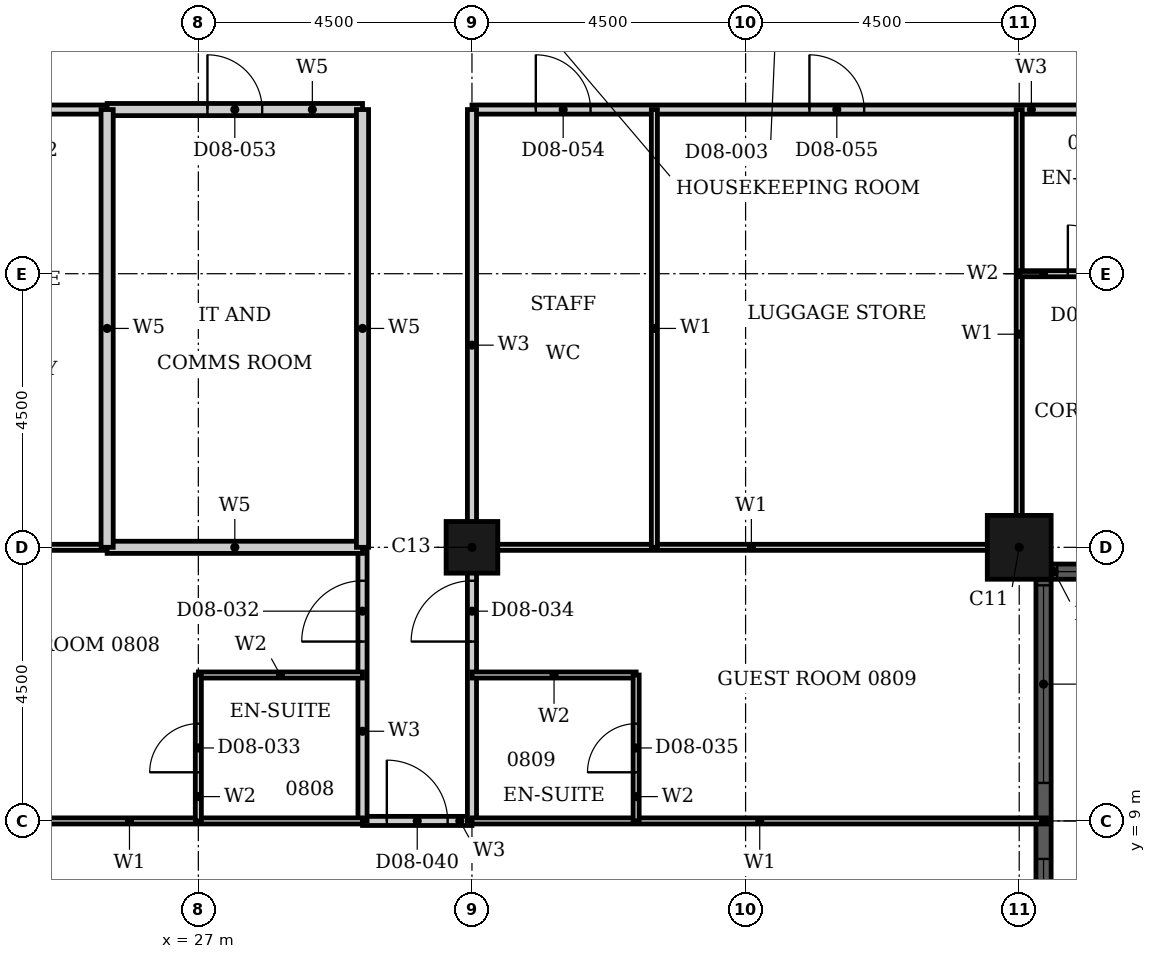
"""IFC4 building model, lengths in metres.
Left out: names, types, materials, properties, quantities, classifications, styles, units other than length and angle.
Written with IfcOpenShell. Run it as: python <this file> out.ifc"""

import sys

from ifc_helpers import new_model, si_unit, direction, frame, frame_2d, origin, origin_2d, place, context, subcontext, project, spatial, rectangle, hollow_rectangle, extrude, element, fill, save


model = new_model("IFC4")
c1 = context("Model", 3, precision=1e-05, world=origin(), true_north=direction((0.0, 1.0)))
c2 = subcontext(c1, "Body", "Model", "MODEL_VIEW")
j1 = project(units=[si_unit("LENGTHUNIT", "METRE"), si_unit("PLANEANGLEUNIT", "RADIAN")], contexts=[c1])
p1 = place(None, origin())
s1 = spatial("IfcSite", under=j1, at=p1, CompositionType="ELEMENT")
p2 = place(p1, origin())
s2 = spatial("IfcBuilding", under=s1, at=p2, CompositionType="ELEMENT")
p3 = place(p2, frame((0.0, 0.0, 40.8)))
s3 = spatial("IfcBuildingStorey", under=s2, at=p3, CompositionType="ELEMENT", Elevation=40.8)
p4 = place(p3, frame((40.5, 13.5, 0.0), z_axis=(0.0, 0.0, 1.0), x_axis=(1.0, 0.0, 0.0)))
e1 = element("IfcColumn", 1, at=p4, inside=s3, PredefinedType="COLUMN", context=c2, shape_type="SweptSolid", body=[
    extrude(hollow_rectangle(XDim=1.05, YDim=1.05, WallThickness=0.034, at=origin_2d()), origin(), (0.0, 0.0, 1.0), 3.6),
])
p5 = place(p3, frame((31.5, 13.5, 0.0), z_axis=(0.0, 0.0, 1.0), x_axis=(1.0, 0.0, 0.0)))
e2 = element("IfcColumn", 2, at=p5, inside=s3, PredefinedType="COLUMN", context=c2, shape_type="SweptSolid", body=[
    extrude(hollow_rectangle(XDim=0.85, YDim=0.85, WallThickness=0.026, at=origin_2d()), origin(), (0.0, 0.0, 1.0), 3.6),
])
p6 = place(p3, frame((40.9, 5.025, 0.0), z_axis=(0.0, 0.0, 1.0), x_axis=(0.0, 1.0, 0.0)))
e3 = element("IfcWall", 3, at=p6, inside=s3, PredefinedType="SOLIDWALL", context=c2, shape_type="SweptSolid", body=[
    extrude(rectangle(XDim=7.95, YDim=0.25, at=frame_2d((3.975, 0.0))), origin(), (0.0, 0.0, 1.0), 3.6),
])
p7 = place(p6, frame((0.1, 0.0, 0.9)))
e4 = element("IfcOpeningElement", 4, at=p7, cuts=e3, PredefinedType="OPENING", context=c2, shape_type="SweptSolid", body=[
    extrude(rectangle(XDim=3.25, YDim=2.08, at=frame_2d((1.625, 1.04))), frame((0.0, 0.135, 0.0), z_axis=(0.0, -1.0, 0.0), x_axis=(1.0, 0.0, 0.0)), (0.0, 0.0, 1.0), 0.27),
])
p8 = place(p6, frame((4.6, 0.0, 0.9)))
e5 = element("IfcOpeningElement", 5, at=p8, cuts=e3, PredefinedType="OPENING", context=c2, shape_type="SweptSolid", body=[
    extrude(rectangle(XDim=3.25, YDim=2.08, at=frame_2d((1.625, 1.04))), frame((0.0, 0.135, 0.0), z_axis=(0.0, -1.0, 0.0), x_axis=(1.0, 0.0, 0.0)), (0.0, 0.0, 1.0), 0.27),
])
p9 = place(p3, frame((41.025, 13.1, 0.0), z_axis=(0.0, 0.0, 1.0), x_axis=(1.0, 0.0, 0.0)))
e6 = element("IfcWall", 6, at=p9, inside=s3, PredefinedType="SOLIDWALL", context=c2, shape_type="SweptSolid", body=[
    extrude(rectangle(XDim=3.45, YDim=0.25, at=frame_2d((1.725, 0.0))), origin(), (0.0, 0.0, 1.0), 3.6),
])
p10 = place(p9, frame((0.1, 0.0, 0.9)))
e7 = element("IfcOpeningElement", 7, at=p10, cuts=e6, PredefinedType="OPENING", context=c2, shape_type="SweptSolid", body=[
    extrude(rectangle(XDim=3.25, YDim=2.08, at=frame_2d((1.625, 1.04))), frame((0.0, 0.135, 0.0), z_axis=(0.0, -1.0, 0.0), x_axis=(1.0, 0.0, 0.0)), (0.0, 0.0, 1.0), 0.27),
])
p11 = place(p3, frame((16.2, 20.7, 0.0), z_axis=(0.0, 0.0, 1.0), x_axis=(1.0, 0.0, 0.0)))
e8 = element("IfcWall", 8, at=p11, inside=s3, PredefinedType="PARTITIONING", context=c2, shape_type="SweptSolid", body=[
    extrude(rectangle(XDim=9.3, YDim=0.15, at=frame_2d((4.65, 0.0))), origin(), (0.0, 0.0, 1.0), 3.3),
])
p12 = place(p11, frame((4.75, 0.0, 0.0)))
e9 = element("IfcOpeningElement", 9, at=p12, cuts=e8, PredefinedType="OPENING", context=c2, shape_type="SweptSolid", body=[
    extrude(rectangle(XDim=1.0, YDim=2.1, at=frame_2d((0.5, 1.05))), frame((0.0, 0.085, 0.0), z_axis=(0.0, -1.0, 0.0), x_axis=(1.0, 0.0, 0.0)), (0.0, 0.0, 1.0), 0.17),
])
p13 = place(p11, frame((7.35, 0.0, 0.0)))
e10 = element("IfcOpeningElement", 10, at=p13, cuts=e8, PredefinedType="OPENING", context=c2, shape_type="SweptSolid", body=[
    extrude(rectangle(XDim=0.9, YDim=2.1, at=frame_2d((0.45, 1.05))), frame((0.0, 0.085, 0.0), z_axis=(0.0, -1.0, 0.0), x_axis=(1.0, 0.0, 0.0)), (0.0, 0.0, 1.0), 0.17),
])
p14 = place(p3, frame((31.5, 20.7, 0.0), z_axis=(0.0, 0.0, 1.0), x_axis=(1.0, 0.0, 0.0)))
e11 = element("IfcWall", 11, at=p14, inside=s3, PredefinedType="PARTITIONING", context=c2, shape_type="SweptSolid", body=[
    extrude(rectangle(XDim=15.3, YDim=0.15, at=frame_2d((7.65, 0.0))), origin(), (0.0, 0.0, 1.0), 3.3),
])
p15 = place(p14, frame((11.95, 0.0, 0.0)))
e12 = element("IfcOpeningElement", 12, at=p15, cuts=e11, PredefinedType="OPENING", context=c2, shape_type="SweptSolid", body=[
    extrude(rectangle(XDim=1.0, YDim=2.1, at=frame_2d((0.5, 1.05))), frame((0.0, 0.085, 0.0), z_axis=(0.0, -1.0, 0.0), x_axis=(1.0, 0.0, 0.0)), (0.0, 0.0, 1.0), 0.17),
])
p16 = place(p14, frame((1.05, 0.0, 0.0)))
e13 = element("IfcOpeningElement", 13, at=p16, cuts=e11, PredefinedType="OPENING", context=c2, shape_type="SweptSolid", body=[
    extrude(rectangle(XDim=0.9, YDim=2.1, at=frame_2d((0.45, 1.05))), frame((0.0, 0.085, 0.0), z_axis=(0.0, -1.0, 0.0), x_axis=(1.0, 0.0, 0.0)), (0.0, 0.0, 1.0), 0.17),
])
p17 = place(p14, frame((5.55, 0.0, 0.0)))
e14 = element("IfcOpeningElement", 14, at=p17, cuts=e11, PredefinedType="OPENING", context=c2, shape_type="SweptSolid", body=[
    extrude(rectangle(XDim=0.9, YDim=2.1, at=frame_2d((0.45, 1.05))), frame((0.0, 0.085, 0.0), z_axis=(0.0, -1.0, 0.0), x_axis=(1.0, 0.0, 0.0)), (0.0, 0.0, 1.0), 0.17),
])
p18 = place(p3, frame((29.7, 9.0, 0.0), z_axis=(0.0, 0.0, 1.0), x_axis=(1.0, 0.0, 0.0)))
e15 = element("IfcWall", 15, at=p18, inside=s3, PredefinedType="PARTITIONING", context=c2, shape_type="SweptSolid", body=[
    extrude(rectangle(XDim=1.8, YDim=0.15, at=frame_2d((0.9, 0.0))), origin(), (0.0, 0.0, 1.0), 3.3),
])
p19 = place(p18, frame((0.4, 0.0, 0.0)))
e16 = element("IfcOpeningElement", 16, at=p19, cuts=e15, PredefinedType="OPENING", context=c2, shape_type="SweptSolid", body=[
    extrude(rectangle(XDim=1.0, YDim=2.1, at=frame_2d((0.5, 1.05))), frame((0.0, 0.085, 0.0), z_axis=(0.0, -1.0, 0.0), x_axis=(1.0, 0.0, 0.0)), (0.0, 0.0, 1.0), 0.17),
])
p20 = place(p3, frame((29.7, 9.0, 0.0), z_axis=(0.0, 0.0, 1.0), x_axis=(0.0, 1.0, 0.0)))
e17 = element("IfcWall", 17, at=p20, inside=s3, PredefinedType="PARTITIONING", context=c2, shape_type="SweptSolid", body=[
    extrude(rectangle(XDim=4.5, YDim=0.15, at=frame_2d((2.25, 0.0))), origin(), (0.0, 0.0, 1.0), 3.3),
])
p21 = place(p20, frame((2.95, 0.0, 0.0)))
e18 = element("IfcOpeningElement", 18, at=p21, cuts=e17, PredefinedType="OPENING", context=c2, shape_type="SweptSolid", body=[
    extrude(rectangle(XDim=1.0, YDim=2.1, at=frame_2d((0.5, 1.05))), frame((0.0, 0.085, 0.0), z_axis=(0.0, -1.0, 0.0), x_axis=(1.0, 0.0, 0.0)), (0.0, 0.0, 1.0), 0.17),
])
p22 = place(p3, frame((31.5, 9.0, 0.0), z_axis=(0.0, 0.0, 1.0), x_axis=(0.0, 1.0, 0.0)))
e19 = element("IfcWall", 19, at=p22, inside=s3, PredefinedType="PARTITIONING", context=c2, shape_type="SweptSolid", body=[
    extrude(rectangle(XDim=11.7, YDim=0.15, at=frame_2d((5.85, 0.0))), origin(), (0.0, 0.0, 1.0), 2.58),
])
p23 = place(p22, frame((2.95, 0.0, 0.0)))
e20 = element("IfcOpeningElement", 20, at=p23, cuts=e19, PredefinedType="OPENING", context=c2, shape_type="SweptSolid", body=[
    extrude(rectangle(XDim=1.0, YDim=2.1, at=frame_2d((0.5, 1.05))), frame((0.0, 0.085, 0.0), z_axis=(0.0, -1.0, 0.0), x_axis=(1.0, 0.0, 0.0)), (0.0, 0.0, 1.0), 0.17),
])
p24 = place(p3, frame((31.5, 13.5, 0.0), z_axis=(0.0, 0.0, 1.0), x_axis=(1.0, 0.0, 0.0)))
e21 = element("IfcWall", 21, at=p24, inside=s3, PredefinedType="PARTITIONING", context=c2, shape_type="SweptSolid", body=[
    extrude(rectangle(XDim=9.19, YDim=0.1, at=frame_2d((4.595, 0.0))), origin(), (0.0, 0.0, 1.0), 2.38),
])
p25 = place(p3, frame((22.31, 13.5, 0.0), z_axis=(0.0, 0.0, 1.0), x_axis=(1.0, 0.0, 0.0)))
e22 = element("IfcWall", 22, at=p25, inside=s3, PredefinedType="PARTITIONING", context=c2, shape_type="SweptSolid", body=[
    extrude(rectangle(XDim=3.19, YDim=0.1, at=frame_2d((1.595, 0.0))), origin(), (0.0, 0.0, 1.0), 2.38),
])
p26 = place(p3, frame((31.5, 9.0, 0.0), z_axis=(0.0, 0.0, 1.0), x_axis=(1.0, 0.0, 0.0)))
e23 = element("IfcWall", 23, at=p26, inside=s3, PredefinedType="PARTITIONING", context=c2, shape_type="SweptSolid", body=[
    extrude(rectangle(XDim=9.465, YDim=0.1, at=frame_2d((4.732, 0.0))), origin(), (0.0, 0.0, 1.0), 3.3),
])
p27 = place(p3, frame((22.035, 9.0, 0.0), z_axis=(0.0, 0.0, 1.0), x_axis=(1.0, 0.0, 0.0)))
e24 = element("IfcWall", 24, at=p27, inside=s3, PredefinedType="PARTITIONING", context=c2, shape_type="SweptSolid", body=[
    extrude(rectangle(XDim=7.665, YDim=0.1, at=frame_2d((3.833, 0.0))), origin(), (0.0, 0.0, 1.0), 3.3),
])
p28 = place(p3, frame((34.5, 13.5, 0.0), z_axis=(0.0, 0.0, 1.0), x_axis=(0.0, 1.0, 0.0)))
e25 = element("IfcWall", 25, at=p28, inside=s3, PredefinedType="PARTITIONING", context=c2, shape_type="SweptSolid", body=[
    extrude(rectangle(XDim=7.2, YDim=0.1, at=frame_2d((3.6, 0.0))), origin(), (0.0, 0.0, 1.0), 3.3),
])
p29 = place(p3, frame((40.5, 13.31, 0.0), z_axis=(0.0, 0.0, 1.0), x_axis=(0.0, 1.0, 0.0)))
e26 = element("IfcWall", 26, at=p29, inside=s3, PredefinedType="PARTITIONING", context=c2, shape_type="SweptSolid", body=[
    extrude(rectangle(XDim=7.39, YDim=0.1, at=frame_2d((3.695, 0.0))), origin(), (0.0, 0.0, 1.0), 3.3),
])
for number, where, z_axis, x_axis in (
    (27, (31.5, 11.4, 0.0), (0.0, 0.0, 1.0), (1.0, 0.0, 0.0)),
    (28, (27.0, 11.4, 0.0), (0.0, 0.0, 1.0), (1.0, 0.0, 0.0)),
):
    element("IfcWall", number, at=place(p3, frame(where, z_axis=z_axis, x_axis=x_axis)), inside=s3, PredefinedType="PARTITIONING", context=c2, shape_type="SweptSolid", body=[
        extrude(rectangle(XDim=2.7, YDim=0.1, at=frame_2d((1.35, 0.0))), origin(), (0.0, 0.0, 1.0), 3.3),
    ])
p30 = place(p3, frame((40.5, 18.0, 0.0), z_axis=(0.0, 0.0, 1.0), x_axis=(1.0, 0.0, 0.0)))
e29 = element("IfcWall", 29, at=p30, inside=s3, PredefinedType="PARTITIONING", context=c2, shape_type="SweptSolid", body=[
    extrude(rectangle(XDim=2.4, YDim=0.1, at=frame_2d((1.2, 0.0))), origin(), (0.0, 0.0, 1.0), 3.3),
])
p31 = place(p30, frame((0.8, 0.0, 0.0)))
e30 = element("IfcOpeningElement", 30, at=p31, cuts=e29, PredefinedType="OPENING", context=c2, shape_type="SweptSolid", body=[
    extrude(rectangle(XDim=0.8, YDim=2.1, at=frame_2d((0.4, 1.05))), frame((0.0, 0.06, 0.0), z_axis=(0.0, -1.0, 0.0), x_axis=(1.0, 0.0, 0.0)), (0.0, 0.0, 1.0), 0.12),
])
p32 = place(p3, frame((27.0, 9.0, 0.0), z_axis=(0.0, 0.0, 1.0), x_axis=(0.0, 1.0, 0.0)))
e31 = element("IfcWall", 31, at=p32, inside=s3, PredefinedType="PARTITIONING", context=c2, shape_type="SweptSolid", body=[
    extrude(rectangle(XDim=2.4, YDim=0.1, at=frame_2d((1.2, 0.0))), origin(), (0.0, 0.0, 1.0), 2.58),
])
p33 = place(p32, frame((0.8, 0.0, 0.0)))
e32 = element("IfcOpeningElement", 32, at=p33, cuts=e31, PredefinedType="OPENING", context=c2, shape_type="SweptSolid", body=[
    extrude(rectangle(XDim=0.8, YDim=2.1, at=frame_2d((0.4, 1.05))), frame((0.0, 0.06, 0.0), z_axis=(0.0, -1.0, 0.0), x_axis=(1.0, 0.0, 0.0)), (0.0, 0.0, 1.0), 0.12),
])
p34 = place(p3, frame((34.2, 9.0, 0.0), z_axis=(0.0, 0.0, 1.0), x_axis=(0.0, 1.0, 0.0)))
e33 = element("IfcWall", 33, at=p34, inside=s3, PredefinedType="PARTITIONING", context=c2, shape_type="SweptSolid", body=[
    extrude(rectangle(XDim=2.4, YDim=0.1, at=frame_2d((1.2, 0.0))), origin(), (0.0, 0.0, 1.0), 3.3),
])
p35 = place(p34, frame((0.8, 0.0, 0.0)))
e34 = element("IfcOpeningElement", 34, at=p35, cuts=e33, PredefinedType="OPENING", context=c2, shape_type="SweptSolid", body=[
    extrude(rectangle(XDim=0.8, YDim=2.1, at=frame_2d((0.4, 1.05))), frame((0.0, 0.06, 0.0), z_axis=(0.0, -1.0, 0.0), x_axis=(1.0, 0.0, 0.0)), (0.0, 0.0, 1.0), 0.12),
])
p36 = place(p3, frame((25.5, 13.5, 0.0), z_axis=(0.0, 0.0, 1.0), x_axis=(1.0, 0.0, 0.0)))
e35 = element("IfcWall", 35, at=p36, inside=s3, PredefinedType="PARTITIONING", context=c2, shape_type="SweptSolid", body=[
    extrude(rectangle(XDim=4.2, YDim=0.2, at=frame_2d((2.1, 0.0))), origin(), (0.0, 0.0, 1.0), 2.38),
])
p37 = place(p3, frame((25.5, 20.7, 0.0), z_axis=(0.0, 0.0, 1.0), x_axis=(1.0, 0.0, 0.0)))
e36 = element("IfcWall", 36, at=p37, inside=s3, PredefinedType="PARTITIONING", context=c2, shape_type="SweptSolid", body=[
    extrude(rectangle(XDim=4.2, YDim=0.2, at=frame_2d((2.1, 0.0))), origin(), (0.0, 0.0, 1.0), 3.3),
])
p38 = place(p37, frame((1.65, 0.0, 0.0)))
e37 = element("IfcOpeningElement", 37, at=p38, cuts=e36, PredefinedType="OPENING", context=c2, shape_type="SweptSolid", body=[
    extrude(rectangle(XDim=0.9, YDim=2.1, at=frame_2d((0.45, 1.05))), frame((0.0, 0.11, 0.0), z_axis=(0.0, -1.0, 0.0), x_axis=(1.0, 0.0, 0.0)), (0.0, 0.0, 1.0), 0.22),
])
for number, where, z_axis, x_axis in (
    (38, (25.5, 13.5, 0.0), (0.0, 0.0, 1.0), (0.0, 1.0, 0.0)),
    (39, (29.7, 13.5, 0.0), (0.0, 0.0, 1.0), (0.0, 1.0, 0.0)),
):
    element("IfcWall", number, at=place(p3, frame(where, z_axis=z_axis, x_axis=x_axis)), inside=s3, PredefinedType="PARTITIONING", context=c2, shape_type="SweptSolid", body=[
        extrude(rectangle(XDim=7.2, YDim=0.2, at=frame_2d((3.6, 0.0))), origin(), (0.0, 0.0, 1.0), 3.3),
    ])
p39 = place(p7, origin())
e40 = element("IfcWindow", 40, at=p39, inside=s3, PartitioningType="SINGLE_PANEL", PredefinedType="WINDOW", context=c2, shape_type="SweptSolid", body=[
    extrude(rectangle(XDim=3.25, YDim=2.08, at=frame_2d((1.625, 1.04))), frame((0.0, 0.03, 0.0), z_axis=(0.0, -1.0, 0.0), x_axis=(1.0, 0.0, 0.0)), (0.0, 0.0, 1.0), 0.06),
])
fill(e4, e40)
p40 = place(p8, origin())
e41 = element("IfcWindow", 41, at=p40, inside=s3, PartitioningType="SINGLE_PANEL", PredefinedType="WINDOW", context=c2, shape_type="SweptSolid", body=[
    extrude(rectangle(XDim=3.25, YDim=2.08, at=frame_2d((1.625, 1.04))), frame((0.0, 0.03, 0.0), z_axis=(0.0, -1.0, 0.0), x_axis=(1.0, 0.0, 0.0)), (0.0, 0.0, 1.0), 0.06),
])
fill(e5, e41)
p41 = place(p10, origin())
e42 = element("IfcWindow", 42, at=p41, inside=s3, PartitioningType="SINGLE_PANEL", PredefinedType="WINDOW", context=c2, shape_type="SweptSolid", body=[
    extrude(rectangle(XDim=3.25, YDim=2.08, at=frame_2d((1.625, 1.04))), frame((0.0, 0.03, 0.0), z_axis=(0.0, -1.0, 0.0), x_axis=(1.0, 0.0, 0.0)), (0.0, 0.0, 1.0), 0.06),
])
fill(e7, e42)
p42 = place(p21, origin())
e43 = element("IfcDoor", 43, at=p42, inside=s3, OperationType="SINGLE_SWING_RIGHT", PredefinedType="DOOR", context=c2, shape_type="SweptSolid", body=[
    extrude(rectangle(XDim=1.0, YDim=2.1, at=frame_2d((0.5, 1.05))), frame((0.0, 0.025, 0.0), z_axis=(0.0, -1.0, 0.0), x_axis=(1.0, 0.0, 0.0)), (0.0, 0.0, 1.0), 0.05),
])
fill(e18, e43)
p43 = place(p33, origin())
e44 = element("IfcDoor", 44, at=p43, inside=s3, OperationType="SINGLE_SWING_LEFT", PredefinedType="DOOR", context=c2, shape_type="SweptSolid", body=[
    extrude(rectangle(XDim=0.8, YDim=2.1, at=frame_2d((0.4, 1.05))), frame((0.0, 0.025, 0.0), z_axis=(0.0, -1.0, 0.0), x_axis=(1.0, 0.0, 0.0)), (0.0, 0.0, 1.0), 0.05),
])
fill(e32, e44)
p44 = place(p23, origin())
e45 = element("IfcDoor", 45, at=p44, inside=s3, OperationType="SINGLE_SWING_RIGHT", PredefinedType="DOOR", context=c2, shape_type="SweptSolid", body=[
    extrude(rectangle(XDim=1.0, YDim=2.1, at=frame_2d((0.5, 1.05))), frame((0.0, 0.025, 0.0), z_axis=(0.0, -1.0, 0.0), x_axis=(1.0, 0.0, 0.0)), (0.0, 0.0, 1.0), 0.05),
])
fill(e20, e45)
p45 = place(p35, origin())
e46 = element("IfcDoor", 46, at=p45, inside=s3, OperationType="SINGLE_SWING_LEFT", PredefinedType="DOOR", context=c2, shape_type="SweptSolid", body=[
    extrude(rectangle(XDim=0.8, YDim=2.1, at=frame_2d((0.4, 1.05))), frame((0.0, 0.025, 0.0), z_axis=(0.0, -1.0, 0.0), x_axis=(1.0, 0.0, 0.0)), (0.0, 0.0, 1.0), 0.05),
])
fill(e34, e46)
p46 = place(p19, origin())
e47 = element("IfcDoor", 47, at=p46, inside=s3, OperationType="SINGLE_SWING_RIGHT", PredefinedType="DOOR", context=c2, shape_type="SweptSolid", body=[
    extrude(rectangle(XDim=1.0, YDim=2.1, at=frame_2d((0.5, 1.05))), frame((0.0, 0.025, 0.0), z_axis=(0.0, -1.0, 0.0), x_axis=(1.0, 0.0, 0.0)), (0.0, 0.0, 1.0), 0.05),
])
fill(e16, e47)
p47 = place(p31, origin())
e48 = element("IfcDoor", 48, at=p47, inside=s3, OperationType="SINGLE_SWING_LEFT", PredefinedType="DOOR", context=c2, shape_type="SweptSolid", body=[
    extrude(rectangle(XDim=0.8, YDim=2.1, at=frame_2d((0.4, 1.05))), frame((0.0, 0.025, 0.0), z_axis=(0.0, -1.0, 0.0), x_axis=(1.0, 0.0, 0.0)), (0.0, 0.0, 1.0), 0.05),
])
fill(e30, e48)
p48 = place(p38, origin())
e49 = element("IfcDoor", 49, at=p48, inside=s3, OperationType="SINGLE_SWING_RIGHT", PredefinedType="DOOR", context=c2, shape_type="SweptSolid", body=[
    extrude(rectangle(XDim=0.9, YDim=2.1, at=frame_2d((0.45, 1.05))), frame((0.0, 0.025, 0.0), z_axis=(0.0, -1.0, 0.0), x_axis=(1.0, 0.0, 0.0)), (0.0, 0.0, 1.0), 0.05),
])
fill(e37, e49)
p49 = place(p16, origin())
e50 = element("IfcDoor", 50, at=p49, inside=s3, OperationType="SINGLE_SWING_RIGHT", PredefinedType="DOOR", context=c2, shape_type="SweptSolid", body=[
    extrude(rectangle(XDim=0.9, YDim=2.1, at=frame_2d((0.45, 1.05))), frame((0.0, 0.025, 0.0), z_axis=(0.0, -1.0, 0.0), x_axis=(1.0, 0.0, 0.0)), (0.0, 0.0, 1.0), 0.05),
])
fill(e13, e50)
p50 = place(p17, origin())
e51 = element("IfcDoor", 51, at=p50, inside=s3, OperationType="SINGLE_SWING_RIGHT", PredefinedType="DOOR", context=c2, shape_type="SweptSolid", body=[
    extrude(rectangle(XDim=0.9, YDim=2.1, at=frame_2d((0.45, 1.05))), frame((0.0, 0.025, 0.0), z_axis=(0.0, -1.0, 0.0), x_axis=(1.0, 0.0, 0.0)), (0.0, 0.0, 1.0), 0.05),
])
fill(e14, e51)
save(model, sys.argv[1])
